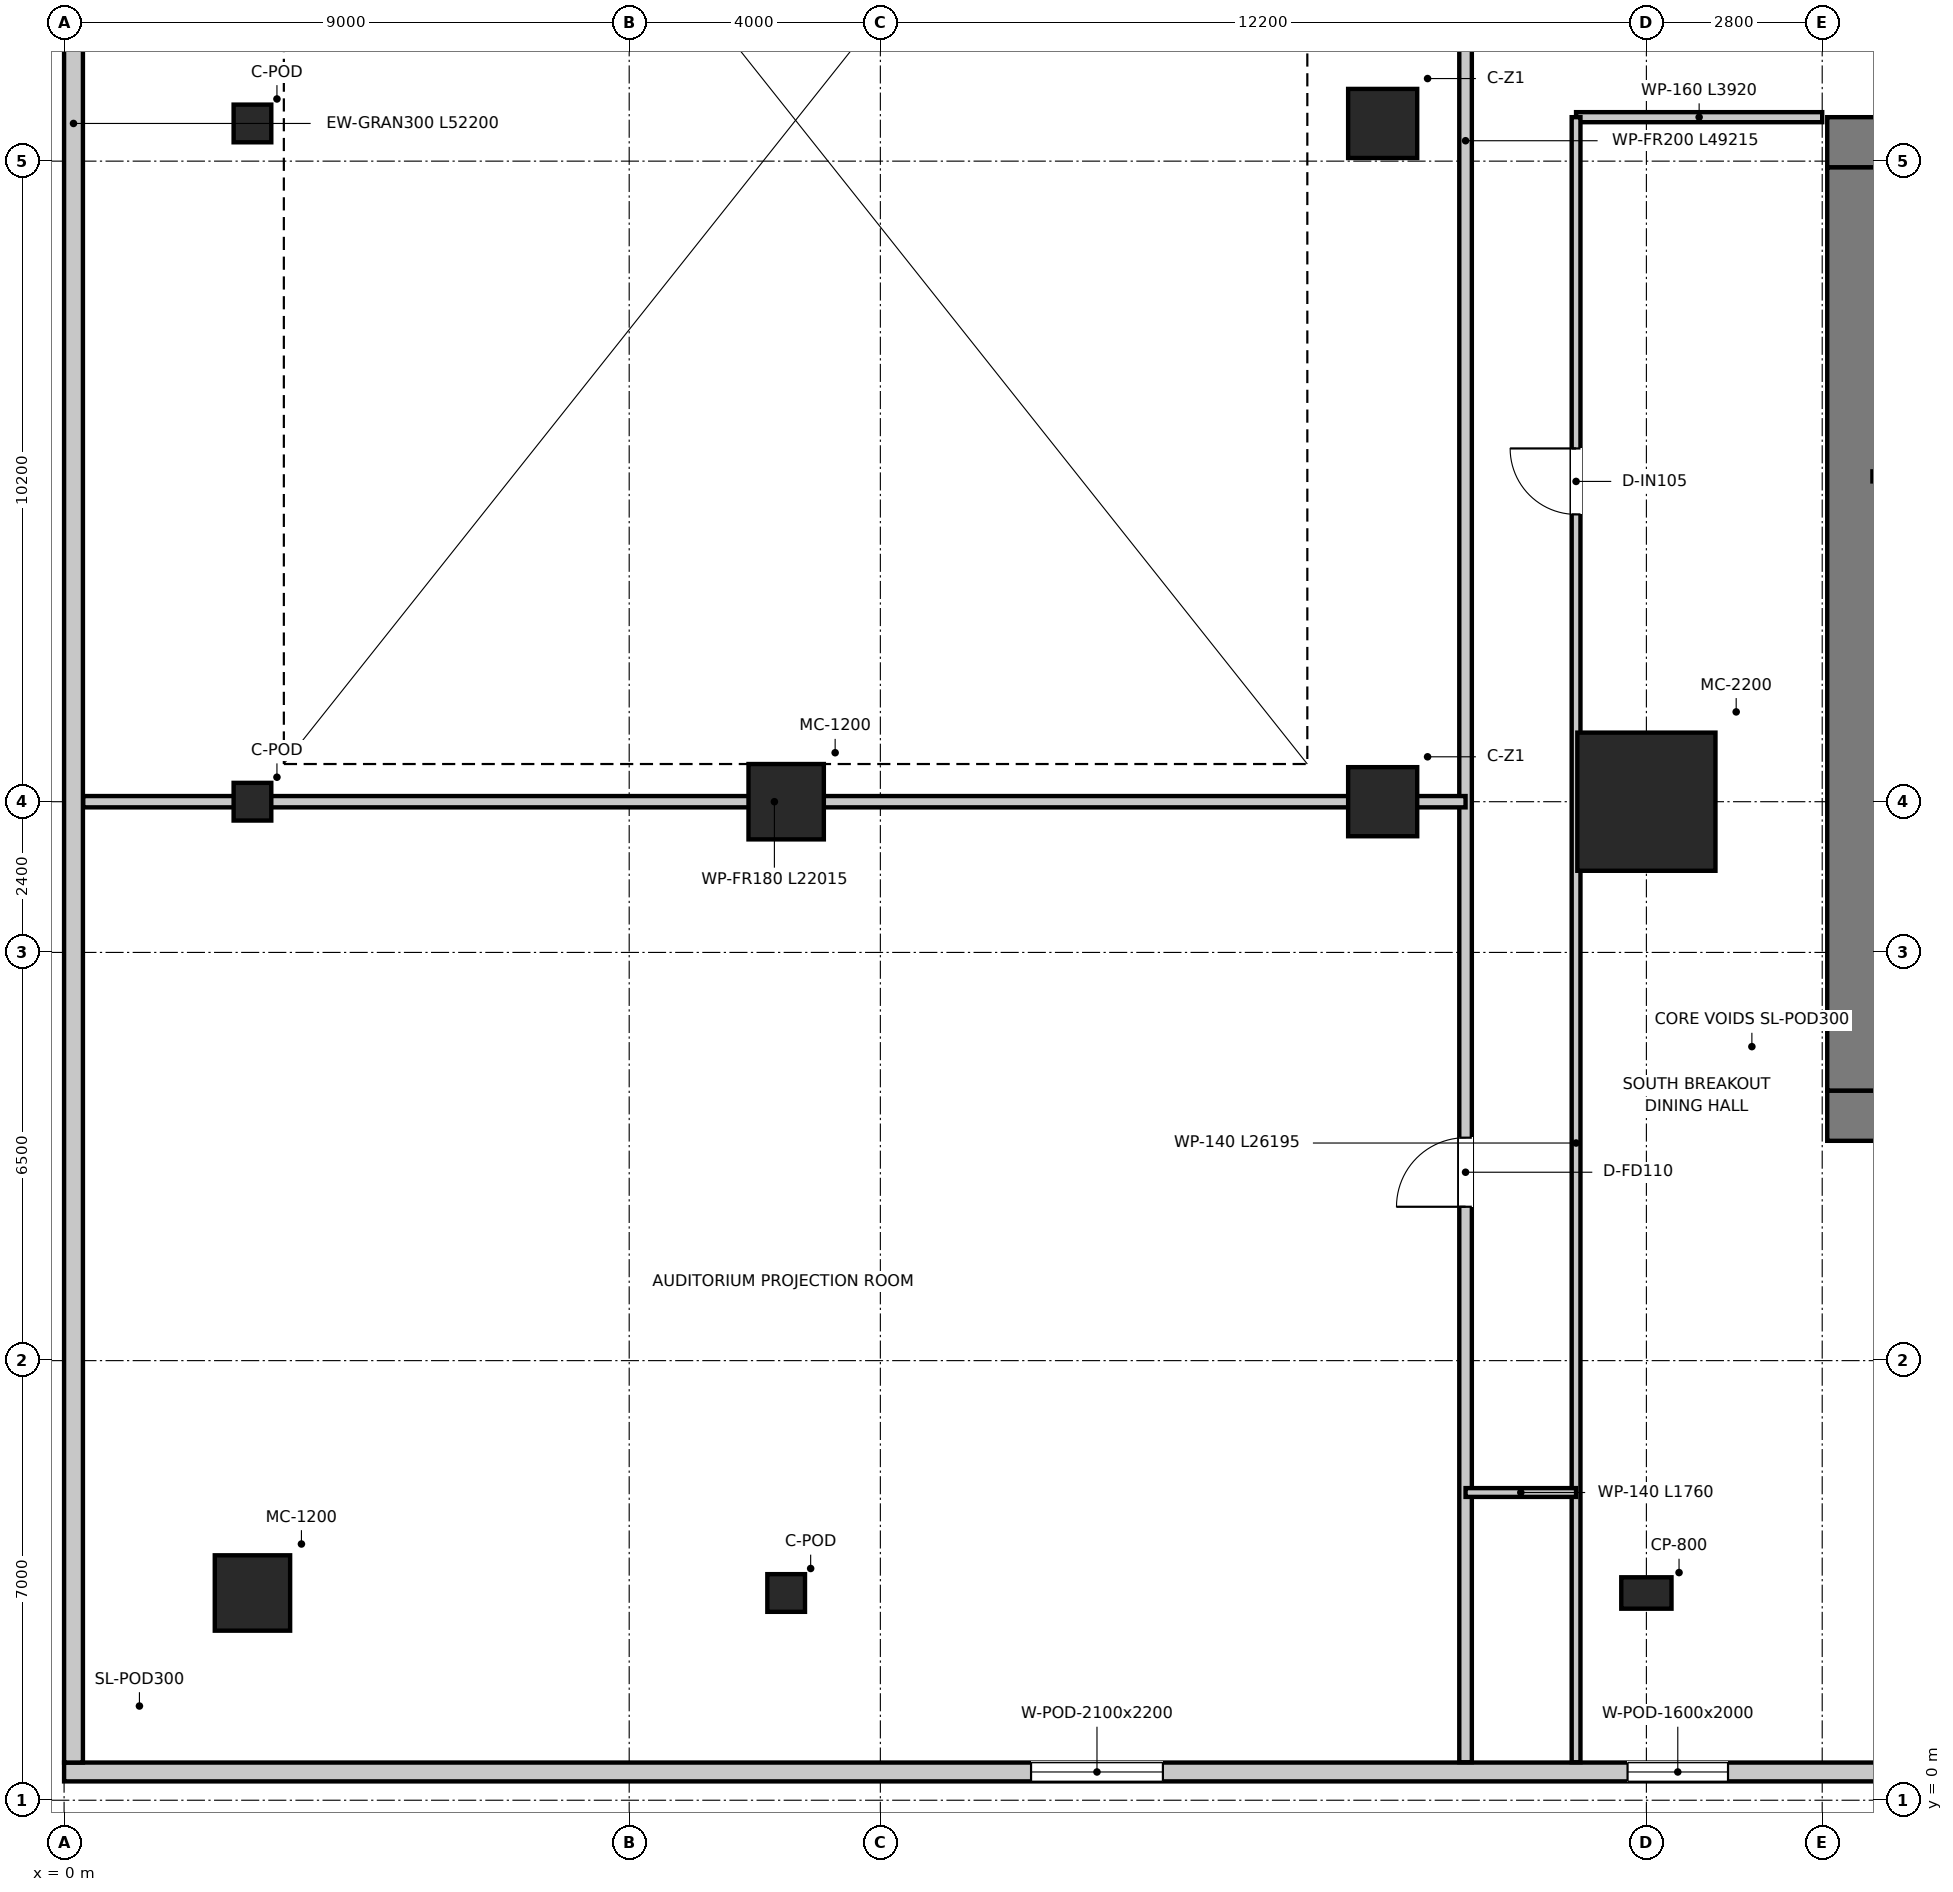
"""IFC4 building model, lengths in metres.
Left out: names, types, materials, properties, quantities, classifications, styles, units other than length and angle.
Written with IfcOpenShell. Run it as: python <this file> out.ifc"""

import sys

from ifc_helpers import new_model, si_unit, direction, frame, frame_2d, origin, origin_2d, place, context, subcontext, project, spatial, rectangle, extrude, source, transform, mapped, element, fill, save


model = new_model("IFC4")
c1 = context("Model", 3, precision=1e-05, world=origin(), true_north=direction((0.0, 1.0)))
c2 = subcontext(c1, "Body", "Model", "MODEL_VIEW")
j1 = project(units=[si_unit("LENGTHUNIT", "METRE"), si_unit("PLANEANGLEUNIT", "RADIAN")], contexts=[c1])
p1 = place(None, origin())
s1 = spatial("IfcSite", under=j1, at=p1, CompositionType="ELEMENT")
p2 = place(p1, origin())
s2 = spatial("IfcBuilding", under=s1, at=p2, CompositionType="ELEMENT")
p3 = place(p2, frame((0.0, 0.0, 10.4)))
s3 = spatial("IfcBuildingStorey", under=s2, at=p3, CompositionType="ELEMENT", Elevation=10.4)
p4 = place(p3, frame((28.08, 10.9, 0.0), z_axis=(0.0, 0.0, 1.0), x_axis=(1.0, 0.0, 0.0)))
e1 = element("IfcWall", 1, at=p4, inside=s3, PredefinedType="SHEAR", context=c2, shape_type="SweptSolid", body=[
    extrude(rectangle(XDim=15.84, YDim=0.8, at=frame_2d((7.92, 0.0))), origin(), (0.0, 0.0, 1.0), 5.0),
])
p5 = place(p3, frame((28.08, 26.4, 0.0), z_axis=(0.0, 0.0, 1.0), x_axis=(1.0, 0.0, 0.0)))
e2 = element("IfcWall", 2, at=p5, inside=s3, PredefinedType="SHEAR", context=c2, shape_type="SweptSolid", body=[
    extrude(rectangle(XDim=15.84, YDim=0.8, at=frame_2d((7.92, 0.0))), origin(), (0.0, 0.0, 1.0), 5.0),
])
p6 = place(p5, frame((7.22, 0.0, 0.0)))
e3 = element("IfcOpeningElement", 3, at=p6, cuts=e2, PredefinedType="OPENING", context=c2, shape_type="SweptSolid", body=[
    extrude(rectangle(XDim=1.4, YDim=2.2, at=frame_2d((0.7, 1.1))), frame((0.0, 0.41, 0.0), z_axis=(0.0, -1.0, 0.0), x_axis=(1.0, 0.0, 0.0)), (0.0, 0.0, 1.0), 0.82),
])
p7 = place(p5, frame((1.775, 0.0, 0.0)))
e4 = element("IfcOpeningElement", 4, at=p7, cuts=e2, PredefinedType="OPENING", context=c2, shape_type="SweptSolid", body=[
    extrude(rectangle(XDim=1.05, YDim=2.1, at=frame_2d((0.525, 1.05))), frame((0.0, 0.41, 0.0), z_axis=(0.0, -1.0, 0.0), x_axis=(1.0, 0.0, 0.0)), (0.0, 0.0, 1.0), 0.82),
])
p8 = place(p5, frame((13.015, 0.0, 0.0)))
e5 = element("IfcOpeningElement", 5, at=p8, cuts=e2, PredefinedType="OPENING", context=c2, shape_type="SweptSolid", body=[
    extrude(rectangle(XDim=1.05, YDim=2.1, at=frame_2d((0.525, 1.05))), frame((0.0, 0.41, 0.0), z_axis=(0.0, -1.0, 0.0), x_axis=(1.0, 0.0, 0.0)), (0.0, 0.0, 1.0), 0.82),
])
p9 = place(p3, frame((28.48, 11.3, 0.0), z_axis=(0.0, 0.0, 1.0), x_axis=(0.0, 1.0, 0.0)))
e6 = element("IfcWall", 6, at=p9, inside=s3, PredefinedType="SHEAR", context=c2, shape_type="SweptSolid", body=[
    extrude(rectangle(XDim=14.7, YDim=0.8, at=frame_2d((7.35, 0.0))), origin(), (0.0, 0.0, 1.0), 5.0),
])
m1 = source(origin(), c2, "Body", "SweptSolid", [
    extrude(rectangle(XDim=2.2, YDim=2.2, at=origin_2d()), origin(), (0.0, 0.0, 1.0), 5.0),
])
p10 = place(p3, frame((25.2, 15.9, 0.0), z_axis=(0.0, 0.0, 1.0), x_axis=(1.0, 0.0, 0.0)))
e7 = element("IfcColumn", 7, at=p10, inside=s3, PredefinedType="USERDEFINED", context=c2, shape_type="MappedRepresentation", body=[
    mapped(m1, transform((0.0, 0.0, 0.0), x_axis=(1.0, 0.0, 0.0), y_axis=(0.0, 1.0, 0.0), z_axis=(0.0, 0.0, 1.0), scale=1.0)),
])
m2 = source(origin(), c2, "Body", "SweptSolid", [
    extrude(rectangle(XDim=1.1, YDim=1.1, at=origin_2d()), origin(), (0.0, 0.0, 1.0), 5.0),
])
for number, where, z_axis, x_axis in (
    (8, (21.0, 15.9, 0.0), (0.0, 0.0, 1.0), (1.0, 0.0, 0.0)),
    (9, (21.0, 26.7, 0.0), (0.0, 0.0, 1.0), (1.0, 0.0, 0.0)),
):
    element("IfcColumn", number, at=place(p3, frame(where, z_axis=z_axis, x_axis=x_axis)), inside=s3, PredefinedType="COLUMN", context=c2, shape_type="MappedRepresentation", body=[
        mapped(m2, transform((0.0, 0.0, 0.0), x_axis=(1.0, 0.0, 0.0), y_axis=(0.0, 1.0, 0.0), z_axis=(0.0, 0.0, 1.0), scale=1.0)),
    ])
m3 = source(origin(), c2, "Body", "SweptSolid", [
    extrude(rectangle(XDim=0.6, YDim=0.6, at=origin_2d()), origin(), (0.0, 0.0, 1.0), 5.0),
])
for number, where, z_axis, x_axis in (
    (10, (3.0, 15.9, 0.0), (0.0, 0.0, 1.0), (1.0, 0.0, 0.0)),
    (11, (3.0, 26.7, 0.0), (0.0, 0.0, 1.0), (1.0, 0.0, 0.0)),
):
    element("IfcColumn", number, at=place(p3, frame(where, z_axis=z_axis, x_axis=x_axis)), inside=s3, PredefinedType="COLUMN", context=c2, shape_type="MappedRepresentation", body=[
        mapped(m3, transform((0.0, 0.0, 0.0), x_axis=(1.0, 0.0, 0.0), y_axis=(0.0, 1.0, 0.0), z_axis=(0.0, 0.0, 1.0), scale=1.0)),
    ])
m4 = source(origin(), c2, "Body", "SweptSolid", [
    extrude(rectangle(XDim=1.2, YDim=1.2, at=origin_2d()), origin(), (0.0, 0.0, 1.0), 5.0),
])
for number, where, z_axis, x_axis in (
    (12, (3.0, 3.3, 0.0), (0.0, 0.0, 1.0), (1.0, 0.0, 0.0)),
    (13, (11.5, 15.9, 0.0), (0.0, 0.0, 1.0), (1.0, 0.0, 0.0)),
):
    element("IfcColumn", number, at=place(p3, frame(where, z_axis=z_axis, x_axis=x_axis)), inside=s3, PredefinedType="USERDEFINED", context=c2, shape_type="MappedRepresentation", body=[
        mapped(m4, transform((0.0, 0.0, 0.0), x_axis=(1.0, 0.0, 0.0), y_axis=(0.0, 1.0, 0.0), z_axis=(0.0, 0.0, 1.0), scale=1.0)),
    ])
p11 = place(p3, frame((11.5, 3.3, 0.0), z_axis=(0.0, 0.0, 1.0), x_axis=(1.0, 0.0, 0.0)))
e14 = element("IfcColumn", 14, at=p11, inside=s3, PredefinedType="COLUMN", context=c2, shape_type="MappedRepresentation", body=[
    mapped(m3, transform((0.0, 0.0, 0.0), x_axis=(1.0, 0.0, 0.0), y_axis=(0.0, 1.0, 0.0), z_axis=(0.0, 0.0, 1.0), scale=1.0)),
])
m5 = source(origin(), c2, "Body", "SweptSolid", [
    extrude(rectangle(XDim=0.8, YDim=0.5, at=origin_2d()), origin(), (0.0, 0.0, 1.0), 5.0),
])
p12 = place(p3, frame((25.2, 3.3, 0.0), z_axis=(0.0, 0.0, 1.0), x_axis=(1.0, 0.0, 0.0)))
e15 = element("IfcColumn", 15, at=p12, inside=s3, PredefinedType="PILASTER", context=c2, shape_type="MappedRepresentation", body=[
    mapped(m5, transform((0.0, 0.0, 0.0), x_axis=(1.0, 0.0, 0.0), y_axis=(0.0, 1.0, 0.0), z_axis=(0.0, 0.0, 1.0), scale=1.0)),
])
p13 = place(p3, frame((72.0, 0.45, 0.0), z_axis=(0.0, 0.0, 1.0), x_axis=(-1.0, 0.0, 0.0)))
e16 = element("IfcWall", 16, at=p13, inside=s3, PredefinedType="SOLIDWALL", context=c2, shape_type="SweptSolid", body=[
    extrude(rectangle(XDim=72.0, YDim=0.3, at=frame_2d((36.0, 0.0))), origin(), (0.0, 0.0, 1.0), 4.7),
])
p14 = place(p13, frame((54.5, 0.0, 1.0)))
e17 = element("IfcOpeningElement", 17, at=p14, cuts=e16, PredefinedType="OPENING", context=c2, shape_type="SweptSolid", body=[
    extrude(rectangle(XDim=2.1, YDim=2.2, at=frame_2d((1.05, 1.1))), frame((0.0, 0.16, 0.0), z_axis=(0.0, -1.0, 0.0), x_axis=(1.0, 0.0, 0.0)), (0.0, 0.0, 1.0), 0.32),
])
p15 = place(p13, frame((45.5, 0.0, 1.05)))
e18 = element("IfcOpeningElement", 18, at=p15, cuts=e16, PredefinedType="OPENING", context=c2, shape_type="SweptSolid", body=[
    extrude(rectangle(XDim=1.6, YDim=2.0, at=frame_2d((0.8, 1.0))), frame((0.0, 0.16, 0.0), z_axis=(0.0, -1.0, 0.0), x_axis=(1.0, 0.0, 0.0)), (0.0, 0.0, 1.0), 0.32),
])
p16 = place(p13, frame((39.0, 0.0, 1.2)))
e19 = element("IfcOpeningElement", 19, at=p16, cuts=e16, PredefinedType="OPENING", context=c2, shape_type="SweptSolid", body=[
    extrude(rectangle(XDim=1.8, YDim=1.6, at=frame_2d((0.9, 0.8))), frame((0.0, 0.16, 0.0), z_axis=(0.0, -1.0, 0.0), x_axis=(1.0, 0.0, 0.0)), (0.0, 0.0, 1.0), 0.32),
])
p17 = place(p13, frame((31.0, 0.0, 1.2)))
e20 = element("IfcOpeningElement", 20, at=p17, cuts=e16, PredefinedType="OPENING", context=c2, shape_type="SweptSolid", body=[
    extrude(rectangle(XDim=1.4, YDim=1.6, at=frame_2d((0.7, 0.8))), frame((0.0, 0.16, 0.0), z_axis=(0.0, -1.0, 0.0), x_axis=(1.0, 0.0, 0.0)), (0.0, 0.0, 1.0), 0.32),
])
p18 = place(p13, frame((21.5, 0.0, 1.25)))
e21 = element("IfcOpeningElement", 21, at=p18, cuts=e16, PredefinedType="OPENING", context=c2, shape_type="SweptSolid", body=[
    extrude(rectangle(XDim=1.1, YDim=1.5, at=frame_2d((0.55, 0.75))), frame((0.0, 0.16, 0.0), z_axis=(0.0, -1.0, 0.0), x_axis=(1.0, 0.0, 0.0)), (0.0, 0.0, 1.0), 0.32),
])
p19 = place(p3, frame((0.15, 0.6, 0.0), z_axis=(0.0, 0.0, 1.0), x_axis=(0.0, 1.0, 0.0)))
e22 = element("IfcWall", 22, at=p19, inside=s3, PredefinedType="SOLIDWALL", context=c2, shape_type="SweptSolid", body=[
    extrude(rectangle(XDim=52.2, YDim=0.3, at=frame_2d((26.1, 0.0))), origin(), (0.0, 0.0, 1.0), 4.7),
])
p20 = place(p3, frame((22.32, 0.605, 0.0), z_axis=(0.0, 0.0, 1.0), x_axis=(0.0, 1.0, 0.0)))
e23 = element("IfcWall", 23, at=p20, inside=s3, PredefinedType="PARTITIONING", context=c2, shape_type="SweptSolid", body=[
    extrude(rectangle(XDim=49.215, YDim=0.2, at=frame_2d((24.607, 0.0))), origin(), (0.0, 0.0, 1.0), 4.0),
])
p21 = place(p20, frame((41.695, 0.0, 0.0)))
e24 = element("IfcOpeningElement", 24, at=p21, cuts=e23, PredefinedType="OPENING", context=c2, shape_type="SweptSolid", body=[
    extrude(rectangle(XDim=1.4, YDim=2.2, at=frame_2d((0.7, 1.1))), frame((0.0, 0.11, 0.0), z_axis=(0.0, -1.0, 0.0), x_axis=(1.0, 0.0, 0.0)), (0.0, 0.0, 1.0), 0.22),
])
p22 = place(p20, frame((8.845, 0.0, 0.0)))
e25 = element("IfcOpeningElement", 25, at=p22, cuts=e23, PredefinedType="OPENING", context=c2, shape_type="SweptSolid", body=[
    extrude(rectangle(XDim=1.1, YDim=2.15, at=frame_2d((0.55, 1.075))), frame((0.0, 0.11, 0.0), z_axis=(0.0, -1.0, 0.0), x_axis=(1.0, 0.0, 0.0)), (0.0, 0.0, 1.0), 0.22),
])
p23 = place(p3, frame((24.08, 26.8, 0.0), z_axis=(0.0, 0.0, 1.0), x_axis=(1.0, 0.0, 0.0)))
e26 = element("IfcWall", 26, at=p23, inside=s3, PredefinedType="PARTITIONING", context=c2, shape_type="SweptSolid", body=[
    extrude(rectangle(XDim=3.92, YDim=0.16, at=frame_2d((1.96, 0.0))), origin(), (0.0, 0.0, 1.0), 3.9),
])
p24 = place(p3, frame((24.08, 0.605, 0.0), z_axis=(0.0, 0.0, 1.0), x_axis=(0.0, 1.0, 0.0)))
e27 = element("IfcWall", 27, at=p24, inside=s3, PredefinedType="PARTITIONING", context=c2, shape_type="SweptSolid", body=[
    extrude(rectangle(XDim=26.195, YDim=0.14, at=frame_2d((13.098, 0.0))), origin(), (0.0, 0.0, 1.0), 4.0),
])
p25 = place(p24, frame((19.87, 0.0, 0.0)))
e28 = element("IfcOpeningElement", 28, at=p25, cuts=e27, PredefinedType="OPENING", context=c2, shape_type="SweptSolid", body=[
    extrude(rectangle(XDim=1.05, YDim=2.15, at=frame_2d((0.525, 1.075))), frame((0.0, 0.08, 0.0), z_axis=(0.0, -1.0, 0.0), x_axis=(1.0, 0.0, 0.0)), (0.0, 0.0, 1.0), 0.16),
])
p26 = place(p3, frame((22.32, 4.9, 0.0), z_axis=(0.0, 0.0, 1.0), x_axis=(1.0, 0.0, 0.0)))
e29 = element("IfcWall", 29, at=p26, inside=s3, PredefinedType="PARTITIONING", context=c2, shape_type="SweptSolid", body=[
    extrude(rectangle(XDim=1.76, YDim=0.14, at=frame_2d((0.88, 0.0))), origin(), (0.0, 0.0, 1.0), 4.7),
])
p27 = place(p3, frame((0.305, 15.9, 0.0), z_axis=(0.0, 0.0, 1.0), x_axis=(1.0, 0.0, 0.0)))
e30 = element("IfcWall", 30, at=p27, inside=s3, PredefinedType="PARTITIONING", context=c2, shape_type="SweptSolid", body=[
    extrude(rectangle(XDim=22.015, YDim=0.18, at=frame_2d((11.008, 0.0))), origin(), (0.0, 0.0, 1.0), 2.9),
])
p28 = place(p14, origin())
e31 = element("IfcWindow", 31, at=p28, inside=s3, PartitioningType="SINGLE_PANEL", PredefinedType="WINDOW", context=c2, shape_type="SweptSolid", body=[
    extrude(rectangle(XDim=2.1, YDim=2.2, at=frame_2d((1.05, 1.1))), frame((0.0, 0.03, 0.0), z_axis=(0.0, -1.0, 0.0), x_axis=(1.0, 0.0, 0.0)), (0.0, 0.0, 1.0), 0.06),
])
fill(e17, e31)
p29 = place(p15, origin())
e32 = element("IfcWindow", 32, at=p29, inside=s3, PartitioningType="SINGLE_PANEL", PredefinedType="WINDOW", context=c2, shape_type="SweptSolid", body=[
    extrude(rectangle(XDim=1.6, YDim=2.0, at=frame_2d((0.8, 1.0))), frame((0.0, 0.03, 0.0), z_axis=(0.0, -1.0, 0.0), x_axis=(1.0, 0.0, 0.0)), (0.0, 0.0, 1.0), 0.06),
])
fill(e18, e32)
p30 = place(p22, origin())
e33 = element("IfcDoor", 33, at=p30, inside=s3, OperationType="SINGLE_SWING_LEFT", PredefinedType="DOOR", context=c2, shape_type="SweptSolid", body=[
    extrude(rectangle(XDim=1.1, YDim=2.15, at=frame_2d((0.55, 1.075))), frame((0.0, 0.025, 0.0), z_axis=(0.0, -1.0, 0.0), x_axis=(1.0, 0.0, 0.0)), (0.0, 0.0, 1.0), 0.05),
])
fill(e25, e33)
p31 = place(p25, origin())
e34 = element("IfcDoor", 34, at=p31, inside=s3, OperationType="SINGLE_SWING_RIGHT", PredefinedType="DOOR", context=c2, shape_type="SweptSolid", body=[
    extrude(rectangle(XDim=1.05, YDim=2.15, at=frame_2d((0.525, 1.075))), frame((0.0, 0.025, 0.0), z_axis=(0.0, -1.0, 0.0), x_axis=(1.0, 0.0, 0.0)), (0.0, 0.0, 1.0), 0.05),
])
fill(e28, e34)
save(model, sys.argv[1])
